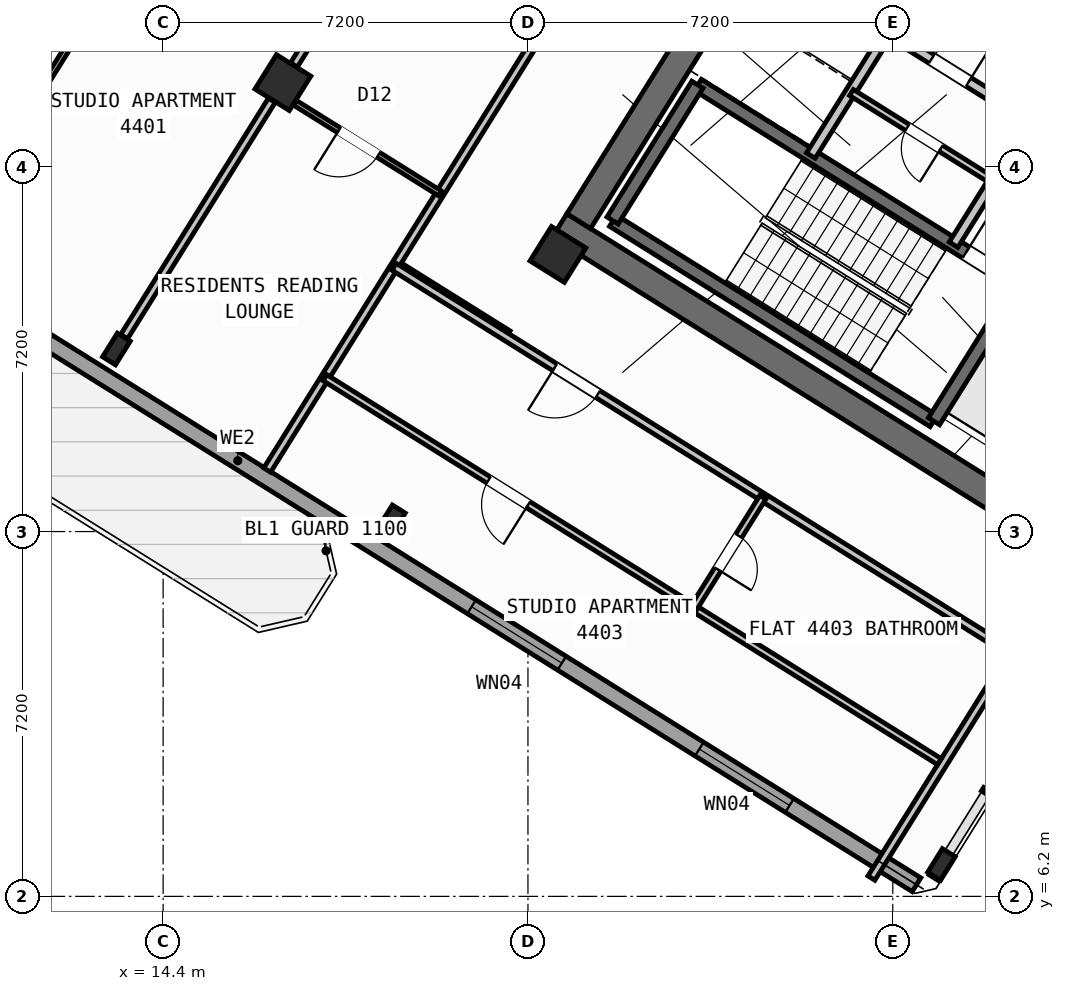
"""IFC4 building model, lengths in metres.
Left out: names, types, materials, properties, quantities, classifications, styles, units other than length and angle.
Written with IfcOpenShell. Run it as: python <this file> out.ifc"""

import sys

from ifc_helpers import new_model, si_unit, direction, frame, frame_2d, origin, origin_2d, place, context, subcontext, project, spatial, rectangle, hollow_rectangle, i_section, extrude, source, transform, mapped, element, fill, save


model = new_model("IFC4")
c1 = context("Model", 3, precision=1e-05, world=origin(), true_north=direction((0.0, 1.0)))
c2 = subcontext(c1, "Body", "Model", "MODEL_VIEW")
j1 = project(units=[si_unit("LENGTHUNIT", "METRE"), si_unit("PLANEANGLEUNIT", "RADIAN")], contexts=[c1])
p1 = place(None, origin())
s1 = spatial("IfcSite", under=j1, at=p1, CompositionType="ELEMENT")
p2 = place(p1, origin())
s2 = spatial("IfcBuilding", under=s1, at=p2, CompositionType="ELEMENT")
p3 = place(p2, frame((0.0, 0.0, 174.9)))
s3 = spatial("IfcBuildingStorey", under=s2, at=p3, CompositionType="ELEMENT", Elevation=174.9)
p4 = place(p3, frame((33.366, 12.477, 0.0), z_axis=(0.0, 0.0, 1.0), x_axis=(-0.848047359947, 0.529920442413, 0.0)))
e1 = element("IfcWall", 1, at=p4, inside=s3, PredefinedType="SHEAR", context=c2, shape_type="SweptSolid", body=[
    extrude(rectangle(XDim=13.14, YDim=0.55, at=frame_2d((6.57, 0.0))), origin(), (0.0, 0.0, 1.0), 4.22),
])
p5 = place(p3, frame((26.007, 24.976, 0.0), z_axis=(0.0, 0.0, 1.0), x_axis=(-0.529923795287, -0.848045264823, 0.0)))
e2 = element("IfcWall", 2, at=p5, inside=s3, PredefinedType="SHEAR", context=c2, shape_type="SweptSolid", body=[
    extrude(rectangle(XDim=6.425, YDim=0.55, at=frame_2d((3.212, 0.0))), origin(), (0.0, 0.0, 1.0), 4.22),
])
m1 = source(origin(), c2, "Body", "SweptSolid", [
    extrude(i_section(OverallWidth=0.3, OverallDepth=0.55, WebThickness=0.015, FlangeThickness=0.029, at=origin_2d()), origin(), (0.0, 0.0, 1.0), 4.5),
])
p6 = place(p3, frame((29.761, 6.829, 0.0), z_axis=(0.0, 0.0, 1.0), x_axis=(-0.848048096156, 0.529919264233, 0.0)))
e3 = element("IfcColumn", 3, at=p6, inside=s3, PredefinedType="COLUMN", context=c2, shape_type="MappedRepresentation", body=[
    mapped(m1, transform((0.0, 0.0, 0.0), scale=1.0)),
])
m2 = source(origin(), c2, "Body", "SweptSolid", [
    extrude(hollow_rectangle(XDim=0.8, YDim=0.8, WallThickness=0.032, at=origin_2d()), origin(), (0.0, 0.0, 1.0), 4.5),
])
p7 = place(p3, frame((22.191, 18.87, 0.0), z_axis=(0.0, 0.0, 1.0), x_axis=(-0.848048096156, 0.529919264233, 0.0)))
e4 = element("IfcColumn", 4, at=p7, inside=s3, PredefinedType="COLUMN", context=c2, shape_type="MappedRepresentation", body=[
    mapped(m2, transform((0.0, 0.0, 0.0), scale=1.0)),
])
p8 = place(p3, frame((18.906, 13.612, 0.0), z_axis=(0.0, 0.0, 1.0), x_axis=(-0.848048096156, 0.529919264233, 0.0)))
e5 = element("IfcColumn", 5, at=p8, inside=s3, PredefinedType="COLUMN", context=c2, shape_type="MappedRepresentation", body=[
    mapped(m1, transform((0.0, 0.0, 0.0), scale=1.0)),
])
p9 = place(p3, frame((16.764, 22.261, 0.0), z_axis=(0.0, 0.0, 1.0), x_axis=(-0.848048096156, 0.529919264233, 0.0)))
e6 = element("IfcColumn", 6, at=p9, inside=s3, PredefinedType="COLUMN", context=c2, shape_type="MappedRepresentation", body=[
    mapped(m2, transform((0.0, 0.0, 0.0), scale=1.0)),
])
p10 = place(p3, frame((13.478, 17.003, 0.0), z_axis=(0.0, 0.0, 1.0), x_axis=(-0.848048096156, 0.529919264233, 0.0)))
e7 = element("IfcColumn", 7, at=p10, inside=s3, PredefinedType="COLUMN", context=c2, shape_type="MappedRepresentation", body=[
    mapped(m1, transform((0.0, 0.0, 0.0), scale=1.0)),
])
p11 = place(p3, frame((29.268, 6.429, 0.0), z_axis=(0.0, 0.0, 1.0), x_axis=(-0.848049971435, 0.529916263149, 0.0)))
e8 = element("IfcWall", 8, at=p11, inside=s3, PredefinedType="STANDARD", context=c2, shape_type="SweptSolid", body=[
    extrude(rectangle(XDim=31.588, YDim=0.32, at=frame_2d((15.794, 0.0))), origin(), (0.0, 0.0, 1.0), 4.22),
])
p12 = place(p11, frame((27.641, 0.0, 0.0)))
e9 = element("IfcOpeningElement", 9, at=p12, cuts=e8, PredefinedType="OPENING", context=c2, shape_type="SweptSolid", body=[
    extrude(rectangle(XDim=1.2, YDim=2.15, at=frame_2d((0.6, 1.075))), frame((0.0, 0.17, 0.0), z_axis=(0.0, -1.0, 0.0), x_axis=(1.0, 0.0, 0.0)), (0.0, 0.0, 1.0), 0.34),
])
p13 = place(p11, frame((2.954, 0.0, 0.8)))
e10 = element("IfcOpeningElement", 10, at=p13, cuts=e8, PredefinedType="OPENING", context=c2, shape_type="SweptSolid", body=[
    extrude(rectangle(XDim=2.1, YDim=1.55, at=frame_2d((1.05, 0.775))), frame((0.0, 0.17, 0.0), z_axis=(0.0, -1.0, 0.0), x_axis=(1.0, 0.0, 0.0)), (0.0, 0.0, 1.0), 0.34),
])
p14 = place(p11, frame((8.253, 0.0, 0.8)))
e11 = element("IfcOpeningElement", 11, at=p14, cuts=e8, PredefinedType="OPENING", context=c2, shape_type="SweptSolid", body=[
    extrude(rectangle(XDim=2.1, YDim=1.55, at=frame_2d((1.05, 0.775))), frame((0.0, 0.17, 0.0), z_axis=(0.0, -1.0, 0.0), x_axis=(1.0, 0.0, 0.0)), (0.0, 0.0, 1.0), 0.34),
])
p15 = place(p11, frame((20.2, 0.0, 1.0)))
e12 = element("IfcOpeningElement", 12, at=p15, cuts=e8, PredefinedType="OPENING", context=c2, shape_type="SweptSolid", body=[
    extrude(rectangle(XDim=0.9, YDim=1.25, at=frame_2d((0.45, 0.625))), frame((0.0, 0.17, 0.0), z_axis=(0.0, -1.0, 0.0), x_axis=(1.0, 0.0, 0.0)), (0.0, 0.0, 1.0), 0.34),
])
p16 = place(p3, frame((29.605, 15.581, 0.0), z_axis=(0.0, 0.0, 1.0), x_axis=(-0.848036911448, 0.529937163087, 0.0)))
e13 = element("IfcWall", 13, at=p16, inside=s3, PredefinedType="SHEAR", context=c2, shape_type="SweptSolid", body=[
    extrude(rectangle(XDim=7.46, YDim=0.26, at=frame_2d((3.73, 0.0))), origin(), (0.0, 0.0, 1.0), 4.22),
])
p17 = place(p3, frame((31.28, 18.261, 0.0), z_axis=(0.0, 0.0, 1.0), x_axis=(-0.848051618787, 0.529913626805, 0.0)))
e14 = element("IfcWall", 14, at=p17, inside=s3, PredefinedType="SHEAR", context=c2, shape_type="SweptSolid", body=[
    extrude(rectangle(XDim=7.46, YDim=0.26, at=frame_2d((3.73, 0.0))), origin(), (0.0, 0.0, 1.0), 4.22),
])
p18 = place(p17, frame((0.36, 0.0, 0.0)))
e15 = element("IfcOpeningElement", 15, at=p18, cuts=e14, PredefinedType="OPENING", context=c2, shape_type="SweptSolid", body=[
    extrude(rectangle(XDim=0.86, YDim=2.05, at=frame_2d((0.43, 1.025))), frame((0.0, 0.14, 0.0), z_axis=(0.0, -1.0, 0.0), x_axis=(1.0, 0.0, 0.0)), (0.0, 0.0, 1.0), 0.28),
])
p19 = place(p3, frame((31.288, 18.256, 0.0), z_axis=(0.0, 0.0, 1.0), x_axis=(-0.529943379326, -0.848033026897, 0.0)))
e16 = element("IfcWall", 16, at=p19, inside=s3, PredefinedType="SHEAR", context=c2, shape_type="SweptSolid", body=[
    extrude(rectangle(XDim=3.16, YDim=0.26, at=frame_2d((1.58, 0.0))), origin(), (0.0, 0.0, 1.0), 4.22),
])
p20 = place(p3, frame((24.945, 22.22, 0.0), z_axis=(0.0, 0.0, 1.0), x_axis=(-0.529908658664, -0.84805472316, 0.0)))
e17 = element("IfcWall", 17, at=p20, inside=s3, PredefinedType="SHEAR", context=c2, shape_type="SweptSolid", body=[
    extrude(rectangle(XDim=3.16, YDim=0.26, at=frame_2d((1.58, 0.0))), origin(), (0.0, 0.0, 1.0), 4.22),
])
p21 = place(p3, frame((32.108, 22.814, 0.0), z_axis=(0.0, 0.0, 1.0), x_axis=(-0.848042229521, 0.529928652696, 0.0)))
e18 = element("IfcWall", 18, at=p21, inside=s3, PredefinedType="STANDARD", context=c2, shape_type="SweptSolid", body=[
    extrude(rectangle(XDim=5.62, YDim=0.2, at=frame_2d((2.81, 0.0))), origin(), (0.0, 0.0, 1.0), 4.21),
])
p22 = place(p21, frame((0.39, 0.0, 0.0)))
e19 = element("IfcOpeningElement", 19, at=p22, cuts=e18, PredefinedType="OPENING", context=c2, shape_type="SweptSolid", body=[
    extrude(rectangle(XDim=1.1, YDim=2.15, at=frame_2d((0.55, 1.075))), frame((0.0, 0.11, 0.0), z_axis=(0.0, -1.0, 0.0), x_axis=(1.0, 0.0, 0.0)), (0.0, 0.0, 1.0), 0.22),
])
p23 = place(p21, frame((2.25, 0.0, 0.0)))
e20 = element("IfcOpeningElement", 20, at=p23, cuts=e18, PredefinedType="OPENING", context=c2, shape_type="SweptSolid", body=[
    extrude(rectangle(XDim=1.1, YDim=2.15, at=frame_2d((0.55, 1.075))), frame((0.0, 0.11, 0.0), z_axis=(0.0, -1.0, 0.0), x_axis=(1.0, 0.0, 0.0)), (0.0, 0.0, 1.0), 0.22),
])
p24 = place(p21, frame((4.11, 0.0, 0.0)))
e21 = element("IfcOpeningElement", 21, at=p24, cuts=e18, PredefinedType="OPENING", context=c2, shape_type="SweptSolid", body=[
    extrude(rectangle(XDim=1.1, YDim=2.15, at=frame_2d((0.55, 1.075))), frame((0.0, 0.11, 0.0), z_axis=(0.0, -1.0, 0.0), x_axis=(1.0, 0.0, 0.0)), (0.0, 0.0, 1.0), 0.22),
])
for number, where, z_axis, x_axis in (
    (22, (31.525, 21.504, 0.0), (0.0, 0.0, 1.0), (-0.53, -0.848, 0.0)),
    (23, (28.71, 23.263, 0.0), (0.0, 0.0, 1.0), (-0.53, -0.848, 0.0)),
):
    element("IfcWall", number, at=place(p3, frame(where, z_axis=z_axis, x_axis=x_axis)), inside=s3, PredefinedType="STANDARD", context=c2, shape_type="SweptSolid", body=[
        extrude(rectangle(XDim=2.88, YDim=0.2, at=frame_2d((1.44, 0.0))), origin(), (0.0, 0.0, 1.0), 4.21),
    ])
p25 = place(p3, frame((31.525, 21.504, 0.0), z_axis=(0.0, 0.0, 1.0), x_axis=(-0.848040211232, 0.529931882541, 0.0)))
e24 = element("IfcWall", 24, at=p25, inside=s3, PredefinedType="STANDARD", context=c2, shape_type="SweptSolid", body=[
    extrude(rectangle(XDim=6.218, YDim=0.2, at=frame_2d((3.109, 0.0))), origin(), (0.0, 0.0, 1.0), 4.21),
])
p26 = place(p25, frame((4.4, 0.0, 0.0)))
e25 = element("IfcOpeningElement", 25, at=p26, cuts=e24, PredefinedType="OPENING", context=c2, shape_type="SweptSolid", body=[
    extrude(rectangle(XDim=0.86, YDim=2.05, at=frame_2d((0.43, 1.025))), frame((0.0, 0.11, 0.0), z_axis=(0.0, -1.0, 0.0), x_axis=(1.0, 0.0, 0.0)), (0.0, 0.0, 1.0), 0.22),
])
p27 = place(p25, frame((1.45, 0.0, 0.0)))
e26 = element("IfcOpeningElement", 26, at=p27, cuts=e24, PredefinedType="OPENING", context=c2, shape_type="SweptSolid", body=[
    extrude(rectangle(XDim=0.86, YDim=2.05, at=frame_2d((0.43, 1.025))), frame((0.0, 0.11, 0.0), z_axis=(0.0, -1.0, 0.0), x_axis=(1.0, 0.0, 0.0)), (0.0, 0.0, 1.0), 0.22),
])
p28 = place(p3, frame((30.766, 20.327, 0.0), z_axis=(0.0, 0.0, 1.0), x_axis=(-0.848052663127, 0.529911955482, 0.0)))
e27 = element("IfcWall", 27, at=p28, inside=s3, PredefinedType="PLUMBINGWALL", context=c2, shape_type="SweptSolid", body=[
    extrude(rectangle(XDim=3.28, YDim=0.14, at=frame_2d((1.64, 0.0))), origin(), (0.0, 0.0, 1.0), 4.21),
])
p29 = place(p28, frame((1.2, 0.0, 0.0)))
e28 = element("IfcOpeningElement", 28, at=p29, cuts=e27, PredefinedType="OPENING", context=c2, shape_type="SweptSolid", body=[
    extrude(rectangle(XDim=0.78, YDim=2.05, at=frame_2d((0.39, 1.025))), frame((0.0, 0.08, 0.0), z_axis=(0.0, -1.0, 0.0), x_axis=(1.0, 0.0, 0.0)), (0.0, 0.0, 1.0), 0.16),
])
p30 = place(p3, frame((21.206, 17.292, 0.0), z_axis=(0.0, 0.0, 1.0), x_axis=(-0.848050851465, 0.529914854792, 0.0)))
e29 = element("IfcWall", 29, at=p30, inside=s3, PredefinedType="PARTITIONING", context=c2, shape_type="SweptSolid", body=[
    extrude(rectangle(XDim=2.61, YDim=0.16, at=frame_2d((1.305, 0.0))), origin(), (0.0, 0.0, 1.0), 4.21),
])
p31 = place(p3, frame((25.198, 28.606, 0.0), z_axis=(0.0, 0.0, 1.0), x_axis=(-0.529921796515, -0.848046513806, 0.0)))
e30 = element("IfcWall", 30, at=p31, inside=s3, PredefinedType="PARTITIONING", context=c2, shape_type="SweptSolid", body=[
    extrude(rectangle(XDim=16.5, YDim=0.16, at=frame_2d((8.25, 0.0))), origin(), (0.0, 0.0, 1.0), 4.21),
])
p32 = place(p3, frame((20.414, 28.103, 0.0), z_axis=(0.0, 0.0, 1.0), x_axis=(-0.529934553702, -0.848038542045, 0.0)))
e31 = element("IfcWall", 31, at=p32, inside=s3, PredefinedType="PARTITIONING", context=c2, shape_type="SweptSolid", body=[
    extrude(rectangle(XDim=6.476, YDim=0.16, at=frame_2d((3.238, 0.0))), origin(), (0.0, 0.0, 1.0), 2.395),
])
p33 = place(p3, frame((16.545, 21.912, 0.0), z_axis=(0.0, 0.0, 1.0), x_axis=(-0.52995106774, -0.848028222291, 0.0)))
e32 = element("IfcWall", 32, at=p33, inside=s3, PredefinedType="PARTITIONING", context=c2, shape_type="SweptSolid", body=[
    extrude(rectangle(XDim=5.501, YDim=0.16, at=frame_2d((2.75, 0.0))), origin(), (0.0, 0.0, 1.0), 4.21),
])
p34 = place(p3, frame((19.865, 20.073, 0.0), z_axis=(0.0, 0.0, 1.0), x_axis=(-0.848055143312, 0.529907986259, 0.0)))
e33 = element("IfcWall", 33, at=p34, inside=s3, PredefinedType="PARTITIONING", context=c2, shape_type="SweptSolid", body=[
    extrude(rectangle(XDim=3.378, YDim=0.11, at=frame_2d((1.689, 0.0))), origin(), (0.0, 0.0, 1.0), 2.395),
])
p35 = place(p34, frame((1.435, 0.0, 0.0)))
e34 = element("IfcOpeningElement", 34, at=p35, cuts=e33, PredefinedType="OPENING", context=c2, shape_type="SweptSolid", body=[
    extrude(rectangle(XDim=0.92, YDim=2.08, at=frame_2d((0.46, 1.04))), frame((0.0, 0.065, 0.0), z_axis=(0.0, -1.0, 0.0), x_axis=(1.0, 0.0, 0.0)), (0.0, 0.0, 1.0), 0.13),
])
p36 = place(p3, frame((16.191, 28.833, 0.0), z_axis=(0.0, 0.0, 1.0), x_axis=(-0.529921526101, -0.84804668278, 0.0)))
e35 = element("IfcWall", 35, at=p36, inside=s3, PredefinedType="PARTITIONING", context=c2, shape_type="SweptSolid", body=[
    extrude(rectangle(XDim=12.19, YDim=0.11, at=frame_2d((6.095, 0.0))), origin(), (0.0, 0.0, 1.0), 4.21),
])
p37 = place(p36, frame((0.35, 0.0, 0.0)))
e36 = element("IfcOpeningElement", 36, at=p37, cuts=e35, PredefinedType="OPENING", context=c2, shape_type="SweptSolid", body=[
    extrude(rectangle(XDim=0.92, YDim=2.08, at=frame_2d((0.46, 1.04))), frame((0.0, 0.065, 0.0), z_axis=(0.0, -1.0, 0.0), x_axis=(1.0, 0.0, 0.0)), (0.0, 0.0, 1.0), 0.13),
])
p38 = place(p3, frame((13.486, 35.924, 0.0), z_axis=(0.0, 0.0, 1.0), x_axis=(-0.529920421309, -0.848047373134, 0.0)))
e37 = element("IfcWall", 37, at=p38, inside=s3, PredefinedType="PARTITIONING", context=c2, shape_type="SweptSolid", body=[
    extrude(rectangle(XDim=16.77, YDim=0.11, at=frame_2d((8.385, 0.0))), origin(), (0.0, 0.0, 1.0), 4.21),
])
p39 = place(p38, frame((0.76, 0.0, 0.0)))
e38 = element("IfcOpeningElement", 38, at=p39, cuts=e37, PredefinedType="OPENING", context=c2, shape_type="SweptSolid", body=[
    extrude(rectangle(XDim=0.78, YDim=2.05, at=frame_2d((0.39, 1.025))), frame((0.0, 0.065, 0.0), z_axis=(0.0, -1.0, 0.0), x_axis=(1.0, 0.0, 0.0)), (0.0, 0.0, 1.0), 0.13),
])
p40 = place(p38, frame((5.967, 0.0, 0.0)))
e39 = element("IfcOpeningElement", 39, at=p40, cuts=e37, PredefinedType="OPENING", context=c2, shape_type="SweptSolid", body=[
    extrude(rectangle(XDim=0.92, YDim=2.08, at=frame_2d((0.46, 1.04))), frame((0.0, 0.065, 0.0), z_axis=(0.0, -1.0, 0.0), x_axis=(1.0, 0.0, 0.0)), (0.0, 0.0, 1.0), 0.13),
])
p41 = place(p3, frame((32.164, 10.374, 0.0), z_axis=(0.0, 0.0, 1.0), x_axis=(-0.848044107957, 0.529925646633, 0.0)))
e40 = element("IfcWall", 40, at=p41, inside=s3, PredefinedType="PARTITIONING", context=c2, shape_type="SweptSolid", body=[
    extrude(rectangle(XDim=15.57, YDim=0.16, at=frame_2d((7.785, 0.0))), origin(), (0.0, 0.0, 1.0), 4.21),
])
p42 = place(p41, frame((10.83, 0.0, 0.0)))
e41 = element("IfcOpeningElement", 41, at=p42, cuts=e40, PredefinedType="OPENING", context=c2, shape_type="SweptSolid", body=[
    extrude(rectangle(XDim=1.0, YDim=2.1, at=frame_2d((0.5, 1.05))), frame((0.0, 0.09, 0.0), z_axis=(0.0, -1.0, 0.0), x_axis=(1.0, 0.0, 0.0)), (0.0, 0.0, 1.0), 0.18),
])
p43 = place(p3, frame((31.282, 11.208, 0.0), z_axis=(0.0, 0.0, 1.0), x_axis=(-0.529938869374, -0.84803584519, 0.0)))
e42 = element("IfcWall", 42, at=p43, inside=s3, PredefinedType="PARTITIONING", context=c2, shape_type="SweptSolid", body=[
    extrude(rectangle(XDim=5.48, YDim=0.16, at=frame_2d((2.74, 0.0))), origin(), (0.0, 0.0, 1.0), 4.21),
])
p44 = place(p3, frame((29.72, 8.859, 0.0), z_axis=(0.0, 0.0, 1.0), x_axis=(-0.848049134363, 0.529917602752, 0.0)))
e43 = element("IfcWall", 43, at=p44, inside=s3, PredefinedType="PLUMBINGWALL", context=c2, shape_type="SweptSolid", body=[
    extrude(rectangle(XDim=14.3, YDim=0.14, at=frame_2d((7.15, 0.0))), origin(), (0.0, 0.0, 1.0), 4.21),
])
p45 = place(p44, frame((9.57, 0.0, 0.0)))
e44 = element("IfcOpeningElement", 44, at=p45, cuts=e43, PredefinedType="OPENING", context=c2, shape_type="SweptSolid", body=[
    extrude(rectangle(XDim=0.92, YDim=2.08, at=frame_2d((0.46, 1.04))), frame((0.0, 0.08, 0.0), z_axis=(0.0, -1.0, 0.0), x_axis=(1.0, 0.0, 0.0)), (0.0, 0.0, 1.0), 0.16),
])
p46 = place(p3, frame((26.237, 14.078, 0.0), z_axis=(0.0, 0.0, 1.0), x_axis=(-0.52995640672, -0.848024885824, 0.0)))
e45 = element("IfcWall", 45, at=p46, inside=s3, PredefinedType="PLUMBINGWALL", context=c2, shape_type="SweptSolid", body=[
    extrude(rectangle(XDim=2.58, YDim=0.14, at=frame_2d((1.29, 0.0))), origin(), (0.0, 0.0, 1.0), 4.21),
])
p47 = place(p46, frame((0.9, 0.0, 0.0)))
e46 = element("IfcOpeningElement", 46, at=p47, cuts=e45, PredefinedType="OPENING", context=c2, shape_type="SweptSolid", body=[
    extrude(rectangle(XDim=0.78, YDim=2.05, at=frame_2d((0.39, 1.025))), frame((0.0, 0.08, 0.0), z_axis=(0.0, -1.0, 0.0), x_axis=(1.0, 0.0, 0.0)), (0.0, 0.0, 1.0), 0.16),
])
m3 = source(origin(), c2, "Body", "SweptSolid", [
    extrude(rectangle(XDim=2.1, YDim=1.55, at=frame_2d((1.05, 0.775))), frame((0.0, 0.03, 0.0), z_axis=(0.0, -1.0, 0.0), x_axis=(1.0, 0.0, 0.0)), (0.0, 0.0, 1.0), 0.06),
])
p48 = place(p13, origin())
e47 = element("IfcWindow", 47, at=p48, inside=s3, PartitioningType="SINGLE_PANEL", PredefinedType="WINDOW", context=c2, shape_type="MappedRepresentation", body=[
    mapped(m3, transform((0.0, 0.0, 0.0), scale=1.0)),
])
fill(e10, e47)
p49 = place(p14, origin())
e48 = element("IfcWindow", 48, at=p49, inside=s3, PartitioningType="SINGLE_PANEL", PredefinedType="WINDOW", context=c2, shape_type="MappedRepresentation", body=[
    mapped(m3, transform((0.0, 0.0, 0.0), scale=1.0)),
])
fill(e11, e48)
m4 = source(origin(), c2, "Body", "SweptSolid", [
    extrude(rectangle(XDim=0.86, YDim=2.05, at=frame_2d((0.43, 1.025))), frame((0.0, 0.025, 0.0), z_axis=(0.0, -1.0, 0.0), x_axis=(1.0, 0.0, 0.0)), (0.0, 0.0, 1.0), 0.05),
])
p50 = place(p18, frame((0.86, 0.0, 0.0), z_axis=(0.0, 0.0, 1.0), x_axis=(-1.0, 0.0, 0.0)))
e49 = element("IfcDoor", 49, at=p50, inside=s3, OperationType="SINGLE_SWING_LEFT", PredefinedType="DOOR", context=c2, shape_type="MappedRepresentation", body=[
    mapped(m4, transform((0.0, 0.0, 0.0), scale=1.0)),
])
fill(e15, e49)
p51 = place(p27, frame((0.86, 0.0, 0.0), z_axis=(0.0, 0.0, 1.0), x_axis=(-1.0, 0.0, 0.0)))
e50 = element("IfcDoor", 50, at=p51, inside=s3, OperationType="SINGLE_SWING_RIGHT", PredefinedType="DOOR", context=c2, shape_type="MappedRepresentation", body=[
    mapped(m4, transform((0.0, 0.0, 0.0), scale=1.0)),
])
fill(e26, e50)
m5 = source(origin(), c2, "Body", "SweptSolid", [
    extrude(rectangle(XDim=0.78, YDim=2.05, at=frame_2d((0.39, 1.025))), frame((0.0, 0.025, 0.0), z_axis=(0.0, -1.0, 0.0), x_axis=(1.0, 0.0, 0.0)), (0.0, 0.0, 1.0), 0.05),
])
p52 = place(p29, origin())
e51 = element("IfcDoor", 51, at=p52, inside=s3, OperationType="SINGLE_SWING_LEFT", PredefinedType="DOOR", context=c2, shape_type="MappedRepresentation", body=[
    mapped(m5, transform((0.0, 0.0, 0.0), scale=1.0)),
])
fill(e28, e51)
m6 = source(origin(), c2, "Body", "SweptSolid", [
    extrude(rectangle(XDim=0.92, YDim=2.08, at=frame_2d((0.46, 1.04))), frame((0.0, 0.025, 0.0), z_axis=(0.0, -1.0, 0.0), x_axis=(1.0, 0.0, 0.0)), (0.0, 0.0, 1.0), 0.05),
])
p53 = place(p35, origin())
e52 = element("IfcDoor", 52, at=p53, inside=s3, OperationType="SINGLE_SWING_RIGHT", PredefinedType="DOOR", context=c2, shape_type="MappedRepresentation", body=[
    mapped(m6, transform((0.0, 0.0, 0.0), scale=1.0)),
])
fill(e34, e52)
m7 = source(origin(), c2, "Body", "SweptSolid", [
    extrude(rectangle(XDim=1.0, YDim=2.1, at=frame_2d((0.5, 1.05))), frame((0.0, 0.025, 0.0), z_axis=(0.0, -1.0, 0.0), x_axis=(1.0, 0.0, 0.0)), (0.0, 0.0, 1.0), 0.05),
])
p54 = place(p42, origin())
e53 = element("IfcDoor", 53, at=p54, inside=s3, OperationType="SINGLE_SWING_RIGHT", PredefinedType="DOOR", context=c2, shape_type="MappedRepresentation", body=[
    mapped(m7, transform((0.0, 0.0, 0.0), scale=1.0)),
])
fill(e41, e53)
p55 = place(p45, origin())
e54 = element("IfcDoor", 54, at=p55, inside=s3, OperationType="SINGLE_SWING_LEFT", PredefinedType="DOOR", context=c2, shape_type="MappedRepresentation", body=[
    mapped(m6, transform((0.0, 0.0, 0.0), scale=1.0)),
])
fill(e44, e54)
p56 = place(p47, origin())
e55 = element("IfcDoor", 55, at=p56, inside=s3, OperationType="SINGLE_SWING_RIGHT", PredefinedType="DOOR", context=c2, shape_type="MappedRepresentation", body=[
    mapped(m5, transform((0.0, 0.0, 0.0), scale=1.0)),
])
fill(e46, e55)
save(model, sys.argv[1])
